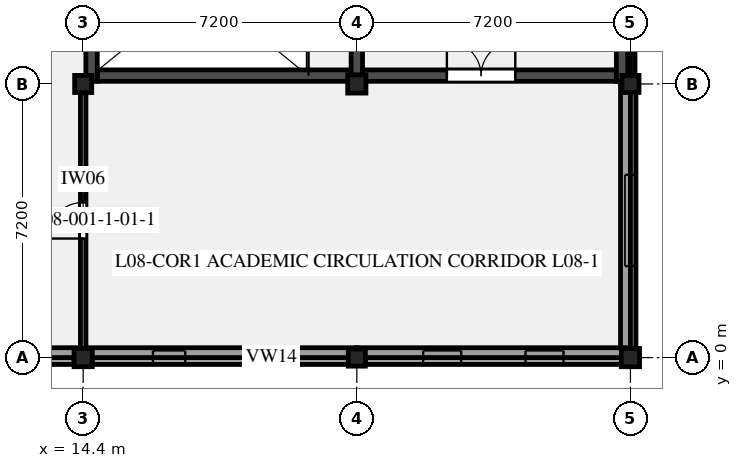
"""IFC4 building model, lengths in metres.
Left out: names, types, materials, properties, quantities, classifications, styles, units other than length and angle.
Written with IfcOpenShell. Run it as: python <this file> out.ifc"""

import sys

from ifc_helpers import new_model, si_unit, direction, frame, frame_2d, origin, origin_2d, place, context, subcontext, project, spatial, rectangle, extrude, element, fill, save


model = new_model("IFC4")
c1 = context("Model", 3, precision=1e-05, world=origin(), true_north=direction((0.0, 1.0)))
c2 = subcontext(c1, "Body", "Model", "MODEL_VIEW")
j1 = project(units=[si_unit("LENGTHUNIT", "METRE"), si_unit("PLANEANGLEUNIT", "RADIAN")], contexts=[c1])
p1 = place(None, origin())
s1 = spatial("IfcSite", under=j1, at=p1, CompositionType="ELEMENT")
p2 = place(p1, origin())
s2 = spatial("IfcBuilding", under=s1, at=p2, CompositionType="ELEMENT")
p3 = place(p2, frame((0.0, 0.0, 34.5)))
s3 = spatial("IfcBuildingStorey", under=s2, at=p3, CompositionType="ELEMENT", Elevation=34.5)
p4 = place(p3, frame((14.4, 0.0, 0.0), z_axis=(0.0, 0.0, 1.0), x_axis=(1.0, 0.0, 0.0)))
e1 = element("IfcColumn", 1, at=p4, inside=s3, PredefinedType="COLUMN", context=c2, shape_type="SweptSolid", body=[
    extrude(rectangle(XDim=0.48, YDim=0.48, at=origin_2d()), origin(), (0.0, 0.0, 1.0), 3.695),
])
for number, where, z_axis, x_axis in (
    (2, (14.4, 7.2, 0.0), (0.0, 0.0, 1.0), (1.0, 0.0, 0.0)),
    (3, (21.6, 0.0, 0.0), (0.0, 0.0, 1.0), (1.0, 0.0, 0.0)),
):
    element("IfcColumn", number, at=place(p3, frame(where, z_axis=z_axis, x_axis=x_axis)), inside=s3, PredefinedType="COLUMN", context=c2, shape_type="SweptSolid", body=[
        extrude(rectangle(XDim=0.45, YDim=0.45, at=origin_2d()), origin(), (0.0, 0.0, 1.0), 3.695),
    ])
for number, where, z_axis, x_axis in (
    (4, (21.6, 7.2, 0.0), (0.0, 0.0, 1.0), (1.0, 0.0, 0.0)),
    (5, (28.8, 0.0, 0.0), (0.0, 0.0, 1.0), (1.0, 0.0, 0.0)),
):
    element("IfcColumn", number, at=place(p3, frame(where, z_axis=z_axis, x_axis=x_axis)), inside=s3, PredefinedType="COLUMN", context=c2, shape_type="SweptSolid", body=[
        extrude(rectangle(XDim=0.48, YDim=0.48, at=origin_2d()), origin(), (0.0, 0.0, 1.0), 3.695),
    ])
p5 = place(p3, frame((28.8, 7.2, 0.0), z_axis=(0.0, 0.0, 1.0), x_axis=(1.0, 0.0, 0.0)))
e6 = element("IfcColumn", 6, at=p5, inside=s3, PredefinedType="COLUMN", context=c2, shape_type="SweptSolid", body=[
    extrude(rectangle(XDim=0.45, YDim=0.45, at=origin_2d()), origin(), (0.0, 0.0, 1.0), 3.695),
])
p6 = place(p3, frame((28.8, 14.16, 0.0), z_axis=(0.0, 0.0, 1.0), x_axis=(0.0, -1.0, 0.0)))
e7 = element("IfcWall", 7, at=p6, inside=s3, PredefinedType="STANDARD", context=c2, shape_type="SweptSolid", body=[
    extrude(rectangle(XDim=6.735, YDim=0.24, at=frame_2d((3.367, 0.0))), origin(), (0.0, 0.0, 1.0), 2.89),
])
p7 = place(p3, frame((28.8, 6.975, 0.0), z_axis=(0.0, 0.0, 1.0), x_axis=(0.0, -1.0, 0.0)))
e8 = element("IfcWall", 8, at=p7, inside=s3, PredefinedType="STANDARD", context=c2, shape_type="SweptSolid", body=[
    extrude(rectangle(XDim=6.735, YDim=0.29, at=frame_2d((3.368, 0.0))), origin(), (0.0, 0.0, 1.0), 2.89),
])
p8 = place(p7, frame((2.167, 0.0, 0.98)))
e9 = element("IfcOpeningElement", 9, at=p8, cuts=e8, PredefinedType="OPENING", context=c2, shape_type="SweptSolid", body=[
    extrude(rectangle(XDim=2.4, YDim=1.4, at=frame_2d((1.2, 0.7))), frame((0.0, 0.155, 0.0), z_axis=(0.0, -1.0, 0.0), x_axis=(1.0, 0.0, 0.0)), (0.0, 0.0, 1.0), 0.31),
])
p9 = place(p3, frame((28.56, 0.0, 0.0), z_axis=(0.0, 0.0, 1.0), x_axis=(-1.0, 0.0, 0.0)))
e10 = element("IfcWall", 10, at=p9, inside=s3, PredefinedType="STANDARD", context=c2, shape_type="SweptSolid", body=[
    extrude(rectangle(XDim=6.735, YDim=0.36, at=frame_2d((3.368, 0.0))), origin(), (0.0, 0.0, 1.0), 2.89),
])
p10 = place(p9, frame((1.521, 0.0, 1.15)))
e11 = element("IfcOpeningElement", 11, at=p10, cuts=e10, PredefinedType="OPENING", context=c2, shape_type="SweptSolid", body=[
    extrude(rectangle(XDim=1.0, YDim=1.2, at=frame_2d((0.5, 0.6))), frame((0.0, 0.19, 0.0), z_axis=(0.0, -1.0, 0.0), x_axis=(1.0, 0.0, 0.0)), (0.0, 0.0, 1.0), 0.38),
])
p11 = place(p9, frame((4.215, 0.0, 1.15)))
e12 = element("IfcOpeningElement", 12, at=p11, cuts=e10, PredefinedType="OPENING", context=c2, shape_type="SweptSolid", body=[
    extrude(rectangle(XDim=1.0, YDim=1.2, at=frame_2d((0.5, 0.6))), frame((0.0, 0.19, 0.0), z_axis=(0.0, -1.0, 0.0), x_axis=(1.0, 0.0, 0.0)), (0.0, 0.0, 1.0), 0.38),
])
p12 = place(p3, frame((21.375, 0.0, 0.0), z_axis=(0.0, 0.0, 1.0), x_axis=(-1.0, 0.0, 0.0)))
e13 = element("IfcWall", 13, at=p12, inside=s3, PredefinedType="STANDARD", context=c2, shape_type="SweptSolid", body=[
    extrude(rectangle(XDim=6.735, YDim=0.36, at=frame_2d((3.368, 0.0))), origin(), (0.0, 0.0, 1.0), 2.89),
])
p13 = place(p12, frame((1.595, 0.0, 1.15)))
e14 = element("IfcOpeningElement", 14, at=p13, cuts=e13, PredefinedType="OPENING", context=c2, shape_type="SweptSolid", body=[
    extrude(rectangle(XDim=0.85, YDim=1.25, at=frame_2d((0.425, 0.625))), frame((0.0, 0.19, 0.0), z_axis=(0.0, -1.0, 0.0), x_axis=(1.0, 0.0, 0.0)), (0.0, 0.0, 1.0), 0.38),
])
p14 = place(p12, frame((4.29, 0.0, 1.15)))
e15 = element("IfcOpeningElement", 15, at=p14, cuts=e13, PredefinedType="OPENING", context=c2, shape_type="SweptSolid", body=[
    extrude(rectangle(XDim=0.85, YDim=1.25, at=frame_2d((0.425, 0.625))), frame((0.0, 0.19, 0.0), z_axis=(0.0, -1.0, 0.0), x_axis=(1.0, 0.0, 0.0)), (0.0, 0.0, 1.0), 0.38),
])
p15 = place(p3, frame((14.16, 0.0, 0.0), z_axis=(0.0, 0.0, 1.0), x_axis=(-1.0, 0.0, 0.0)))
e16 = element("IfcWall", 16, at=p15, inside=s3, PredefinedType="STANDARD", context=c2, shape_type="SweptSolid", body=[
    extrude(rectangle(XDim=6.735, YDim=0.36, at=frame_2d((3.367, 0.0))), origin(), (0.0, 0.0, 1.0), 2.89),
])
p16 = place(p15, frame((1.42, 0.0, 1.15)))
e17 = element("IfcOpeningElement", 17, at=p16, cuts=e16, PredefinedType="OPENING", context=c2, shape_type="SweptSolid", body=[
    extrude(rectangle(XDim=1.2, YDim=1.35, at=frame_2d((0.6, 0.675))), frame((0.0, 0.19, 0.0), z_axis=(0.0, -1.0, 0.0), x_axis=(1.0, 0.0, 0.0)), (0.0, 0.0, 1.0), 0.38),
])
p17 = place(p15, frame((4.115, 0.0, 1.15)))
e18 = element("IfcOpeningElement", 18, at=p17, cuts=e16, PredefinedType="OPENING", context=c2, shape_type="SweptSolid", body=[
    extrude(rectangle(XDim=1.2, YDim=1.35, at=frame_2d((0.6, 0.675))), frame((0.0, 0.19, 0.0), z_axis=(0.0, -1.0, 0.0), x_axis=(1.0, 0.0, 0.0)), (0.0, 0.0, 1.0), 0.38),
])
p18 = place(p3, frame((28.67, 14.4, 3.9), z_axis=(0.0, 0.0, 1.0), x_axis=(0.0, -1.0, 0.0)))
e19 = element("IfcWall", 19, at=p18, inside=s3, PredefinedType="PARAPET", context=c2, shape_type="SweptSolid", body=[
    extrude(rectangle(XDim=7.2, YDim=0.26, at=frame_2d((3.6, 0.0))), origin(), (0.0, 0.0, 1.0), 0.9),
])
for number, where, z_axis, x_axis in (
    (20, (28.67, 7.2, 3.695), (0.0, 0.0, 1.0), (0.0, -1.0, 0.0)),
    (21, (28.8, 0.13, 3.695), (0.0, 0.0, 1.0), (-1.0, 0.0, 0.0)),
):
    element("IfcWall", number, at=place(p3, frame(where, z_axis=z_axis, x_axis=x_axis)), inside=s3, PredefinedType="PARAPET", context=c2, shape_type="SweptSolid", body=[
        extrude(rectangle(XDim=7.2, YDim=0.26, at=frame_2d((3.6, 0.0))), origin(), (0.0, 0.0, 1.0), 1.105),
    ])
p19 = place(p3, frame((21.6, 0.13, 3.695), z_axis=(0.0, 0.0, 1.0), x_axis=(-1.0, 0.0, 0.0)))
e22 = element("IfcWall", 22, at=p19, inside=s3, PredefinedType="PARAPET", context=c2, shape_type="SweptSolid", body=[
    extrude(rectangle(XDim=7.2, YDim=0.26, at=frame_2d((3.6, 0.0))), origin(), (0.0, 0.0, 1.0), 1.105),
])
p20 = place(p3, frame((14.4, 0.13, 3.695), z_axis=(0.0, 0.0, 1.0), x_axis=(-1.0, 0.0, 0.0)))
e23 = element("IfcWall", 23, at=p20, inside=s3, PredefinedType="PARAPET", context=c2, shape_type="SweptSolid", body=[
    extrude(rectangle(XDim=7.2, YDim=0.26, at=frame_2d((3.6, 0.0))), origin(), (0.0, 0.0, 1.0), 1.105),
])
p21 = place(p3, frame((14.77, 7.42, 0.0), z_axis=(0.0, 0.0, 1.0), x_axis=(1.0, 0.0, 0.0)))
e24 = element("IfcWall", 24, at=p21, inside=s3, PredefinedType="SHEAR", context=c2, shape_type="SweptSolid", body=[
    extrude(rectangle(XDim=6.68, YDim=0.3, at=frame_2d((3.34, 0.0))), origin(), (0.0, 0.0, 1.0), 3.9),
])
p22 = place(p3, frame((14.62, 14.33, 0.0), z_axis=(0.0, 0.0, 1.0), x_axis=(0.0, -1.0, 0.0)))
e25 = element("IfcWall", 25, at=p22, inside=s3, PredefinedType="SHEAR", context=c2, shape_type="SweptSolid", body=[
    extrude(rectangle(XDim=7.06, YDim=0.3, at=frame_2d((3.53, 0.0))), origin(), (0.0, 0.0, 1.0), 3.9),
])
p23 = place(p3, frame((21.6, 7.27, 0.0), z_axis=(0.0, 0.0, 1.0), x_axis=(0.0, 1.0, 0.0)))
e26 = element("IfcWall", 26, at=p23, inside=s3, PredefinedType="SHEAR", context=c2, shape_type="SweptSolid", body=[
    extrude(rectangle(XDim=7.06, YDim=0.3, at=frame_2d((3.53, 0.0))), origin(), (0.0, 0.0, 1.0), 3.9),
])
p24 = place(p23, frame((1.4, 0.0, 0.0)))
e27 = element("IfcOpeningElement", 27, at=p24, cuts=e26, PredefinedType="OPENING", context=c2, shape_type="SweptSolid", body=[
    extrude(rectangle(XDim=1.8, YDim=2.2, at=frame_2d((0.9, 1.1))), frame((0.0, 0.16, 0.0), z_axis=(0.0, -1.0, 0.0), x_axis=(1.0, 0.0, 0.0)), (0.0, 0.0, 1.0), 0.32),
])
p25 = place(p3, frame((21.75, 7.42, 0.0), z_axis=(0.0, 0.0, 1.0), x_axis=(1.0, 0.0, 0.0)))
e28 = element("IfcWall", 28, at=p25, inside=s3, PredefinedType="SHEAR", context=c2, shape_type="SweptSolid", body=[
    extrude(rectangle(XDim=6.68, YDim=0.3, at=frame_2d((3.34, 0.0))), origin(), (0.0, 0.0, 1.0), 3.9),
])
p26 = place(p25, frame((2.22, 0.0, 0.0)))
e29 = element("IfcOpeningElement", 29, at=p26, cuts=e28, PredefinedType="OPENING", context=c2, shape_type="SweptSolid", body=[
    extrude(rectangle(XDim=1.8, YDim=2.2, at=frame_2d((0.9, 1.1))), frame((0.0, 0.16, 0.0), z_axis=(0.0, -1.0, 0.0), x_axis=(1.0, 0.0, 0.0)), (0.0, 0.0, 1.0), 0.32),
])
p27 = place(p3, frame((28.58, 7.27, 0.0), z_axis=(0.0, 0.0, 1.0), x_axis=(0.0, 1.0, 0.0)))
e30 = element("IfcWall", 30, at=p27, inside=s3, PredefinedType="SHEAR", context=c2, shape_type="SweptSolid", body=[
    extrude(rectangle(XDim=7.06, YDim=0.3, at=frame_2d((3.53, 0.0))), origin(), (0.0, 0.0, 1.0), 3.9),
])
p28 = place(p3, frame((14.4, 0.245, 0.0), z_axis=(0.0, 0.0, 1.0), x_axis=(0.0, 1.0, 0.0)))
e31 = element("IfcWall", 31, at=p28, inside=s3, PredefinedType="PARTITIONING", context=c2, shape_type="SweptSolid", body=[
    extrude(rectangle(XDim=6.725, YDim=0.145, at=frame_2d((3.362, 0.0))), origin(), (0.0, 0.0, 1.0), 2.89),
])
p29 = place(p28, frame((2.887, 0.0, 0.0)))
e32 = element("IfcOpeningElement", 32, at=p29, cuts=e31, PredefinedType="OPENING", context=c2, shape_type="SweptSolid", body=[
    extrude(rectangle(XDim=0.95, YDim=2.15, at=frame_2d((0.475, 1.075))), frame((0.0, 0.083, 0.0), z_axis=(0.0, -1.0, 0.0), x_axis=(1.0, 0.0, 0.0)), (0.0, 0.0, 1.0), 0.165),
])
p30 = place(p8, origin())
e33 = element("IfcWindow", 33, at=p30, inside=s3, PartitioningType="SINGLE_PANEL", PredefinedType="WINDOW", context=c2, shape_type="SweptSolid", body=[
    extrude(rectangle(XDim=2.4, YDim=1.4, at=frame_2d((1.2, 0.7))), frame((0.0, -0.03, 0.0), z_axis=(0.0, -1.0, 0.0), x_axis=(1.0, 0.0, 0.0)), (0.0, 0.0, 1.0), 0.06),
])
fill(e9, e33)
p31 = place(p10, origin())
e34 = element("IfcWindow", 34, at=p31, inside=s3, PartitioningType="SINGLE_PANEL", PredefinedType="WINDOW", context=c2, shape_type="SweptSolid", body=[
    extrude(rectangle(XDim=1.0, YDim=1.2, at=frame_2d((0.5, 0.6))), frame((0.0, -0.08, 0.0), z_axis=(0.0, -1.0, 0.0), x_axis=(1.0, 0.0, 0.0)), (0.0, 0.0, 1.0), 0.06),
])
fill(e11, e34)
p32 = place(p11, origin())
e35 = element("IfcWindow", 35, at=p32, inside=s3, PartitioningType="SINGLE_PANEL", PredefinedType="WINDOW", context=c2, shape_type="SweptSolid", body=[
    extrude(rectangle(XDim=1.0, YDim=1.2, at=frame_2d((0.5, 0.6))), frame((0.0, -0.08, 0.0), z_axis=(0.0, -1.0, 0.0), x_axis=(1.0, 0.0, 0.0)), (0.0, 0.0, 1.0), 0.06),
])
fill(e12, e35)
p33 = place(p13, origin())
e36 = element("IfcWindow", 36, at=p33, inside=s3, PartitioningType="SINGLE_PANEL", PredefinedType="WINDOW", context=c2, shape_type="SweptSolid", body=[
    extrude(rectangle(XDim=0.85, YDim=1.25, at=frame_2d((0.425, 0.625))), frame((0.0, -0.08, 0.0), z_axis=(0.0, -1.0, 0.0), x_axis=(1.0, 0.0, 0.0)), (0.0, 0.0, 1.0), 0.06),
])
fill(e14, e36)
p34 = place(p14, origin())
e37 = element("IfcWindow", 37, at=p34, inside=s3, PartitioningType="SINGLE_PANEL", PredefinedType="WINDOW", context=c2, shape_type="SweptSolid", body=[
    extrude(rectangle(XDim=0.85, YDim=1.25, at=frame_2d((0.425, 0.625))), frame((0.0, -0.08, 0.0), z_axis=(0.0, -1.0, 0.0), x_axis=(1.0, 0.0, 0.0)), (0.0, 0.0, 1.0), 0.06),
])
fill(e15, e37)
p35 = place(p26, origin())
e38 = element("IfcDoor", 38, at=p35, inside=s3, OperationType="DOUBLE_DOOR_SINGLE_SWING", PredefinedType="DOOR", context=c2, shape_type="SweptSolid", body=[
    extrude(rectangle(XDim=1.8, YDim=2.2, at=frame_2d((0.9, 1.1))), frame((0.0, 0.025, 0.0), z_axis=(0.0, -1.0, 0.0), x_axis=(1.0, 0.0, 0.0)), (0.0, 0.0, 1.0), 0.05),
])
fill(e29, e38)
p36 = place(p29, origin())
e39 = element("IfcDoor", 39, at=p36, inside=s3, OperationType="SINGLE_SWING_LEFT", PredefinedType="DOOR", context=c2, shape_type="SweptSolid", body=[
    extrude(rectangle(XDim=0.95, YDim=2.15, at=frame_2d((0.475, 1.075))), frame((0.0, 0.025, 0.0), z_axis=(0.0, -1.0, 0.0), x_axis=(1.0, 0.0, 0.0)), (0.0, 0.0, 1.0), 0.05),
])
fill(e32, e39)
save(model, sys.argv[1])
